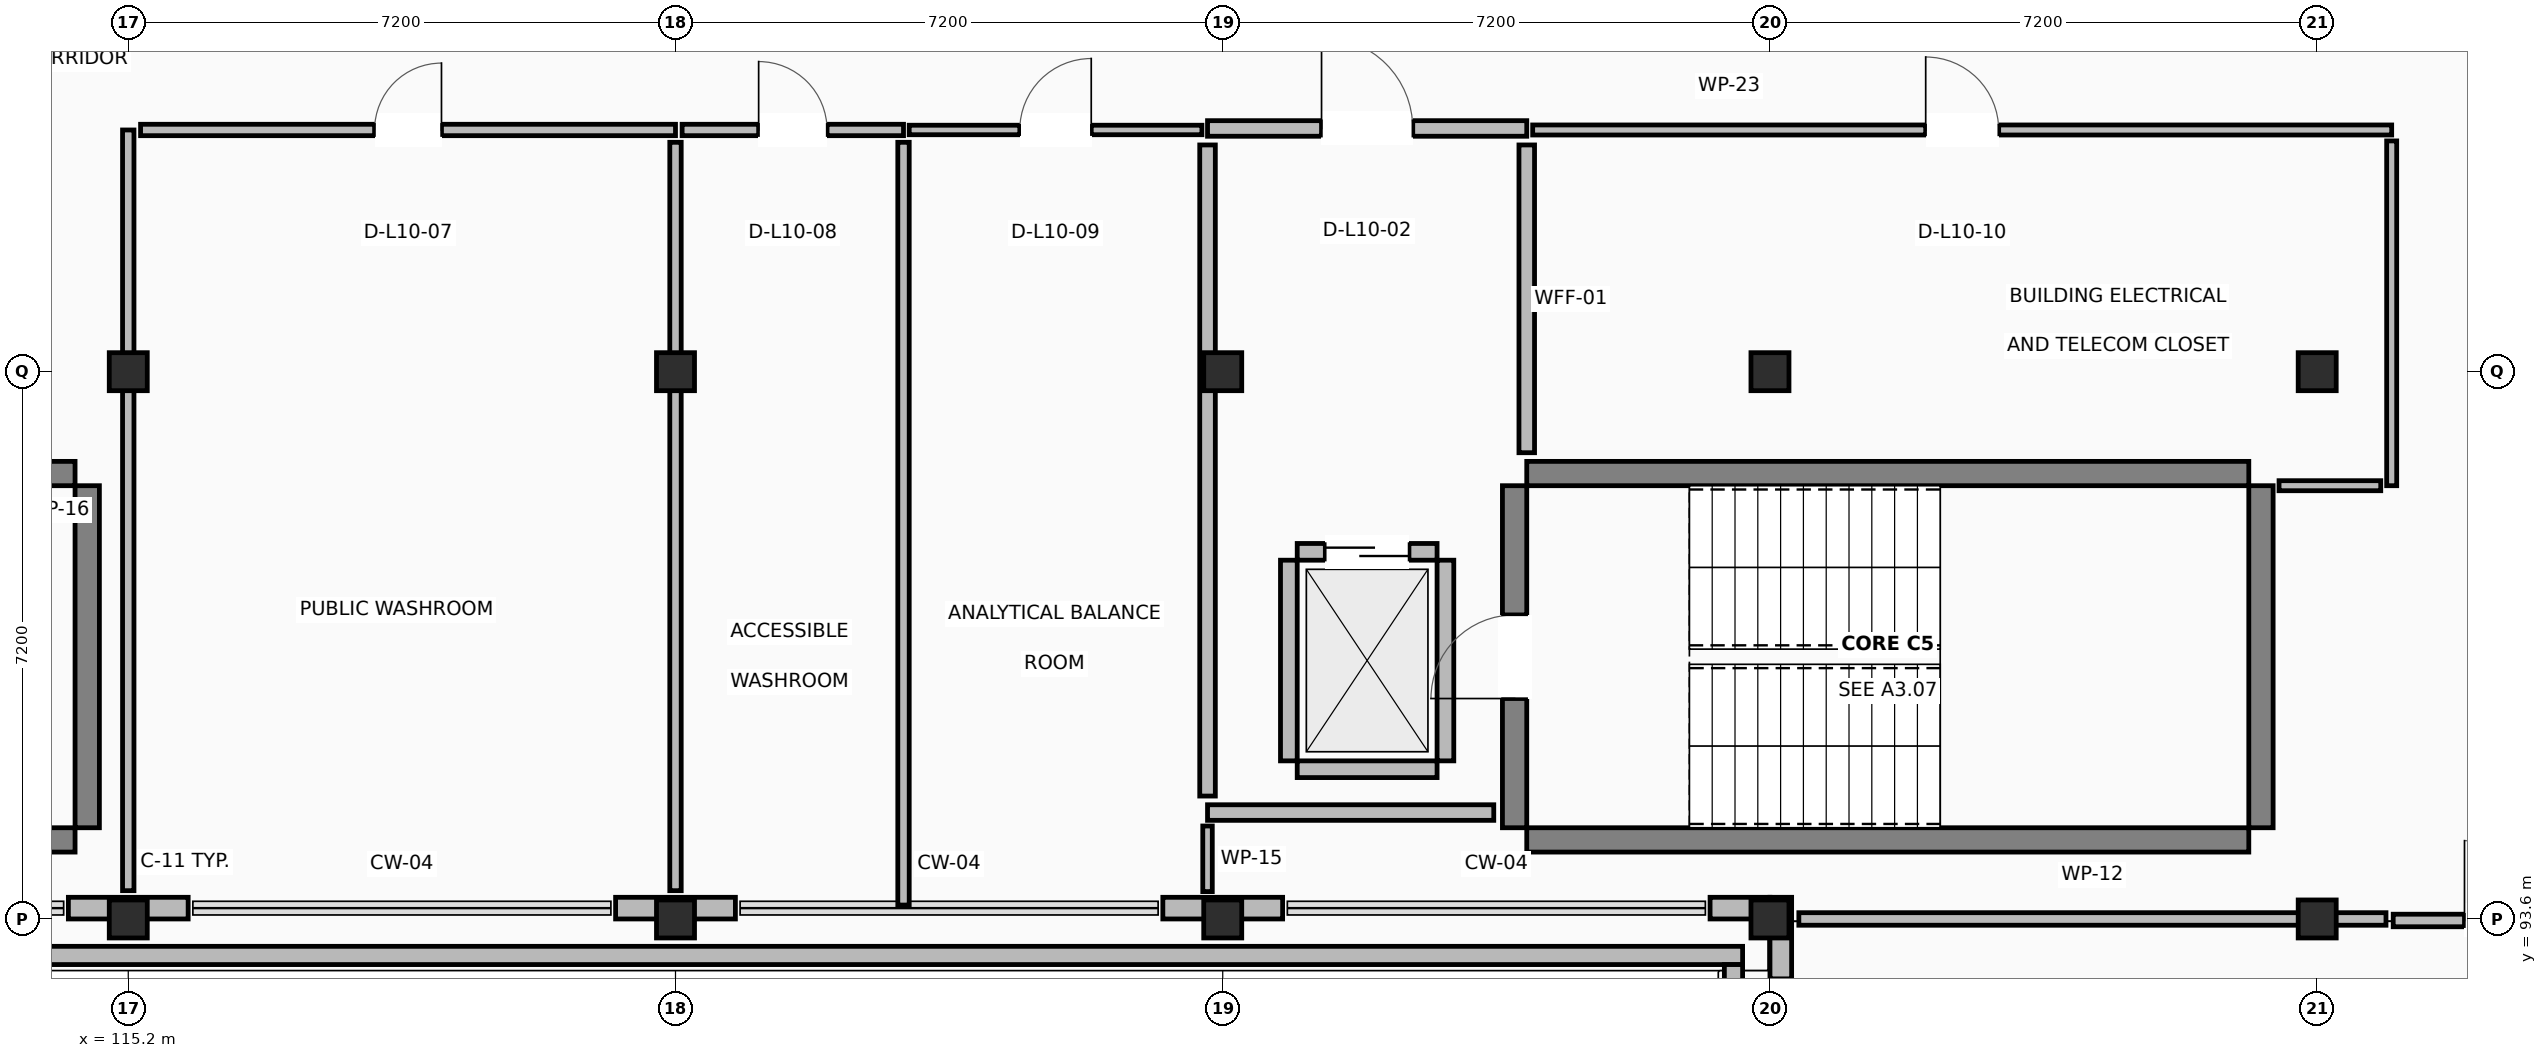
"""IFC4 building model, lengths in metres.
Left out: names, types, materials, properties, quantities, classifications, styles, units other than length and angle.
Written with IfcOpenShell. Run it as: python <this file> out.ifc"""

import sys

from ifc_helpers import new_model, si_unit, direction, frame, frame_2d, origin, origin_2d, place, context, subcontext, project, spatial, rectangle, extrude, element, fill, save


model = new_model("IFC4")
c1 = context("Model", 3, precision=1e-05, world=origin(), true_north=direction((0.0, 1.0)))
c2 = subcontext(c1, "Body", "Model", "MODEL_VIEW")
j1 = project(units=[si_unit("LENGTHUNIT", "METRE"), si_unit("PLANEANGLEUNIT", "RADIAN")], contexts=[c1])
p1 = place(None, origin())
s1 = spatial("IfcSite", under=j1, at=p1, CompositionType="ELEMENT")
p2 = place(p1, origin())
s2 = spatial("IfcBuilding", under=s1, at=p2, CompositionType="ELEMENT")
p3 = place(p2, frame((0.0, 0.0, 43.8)))
s3 = spatial("IfcBuildingStorey", under=s2, at=p3, CompositionType="ELEMENT", Elevation=43.8)
for number, where, z_axis, x_axis in (
    (1, (115.2, 93.6, 0.0), (0.0, 0.0, 1.0), (1.0, 0.0, 0.0)),
    (2, (115.2, 100.8, 0.0), (0.0, 0.0, 1.0), (1.0, 0.0, 0.0)),
    (3, (122.4, 93.6, 0.0), (0.0, 0.0, 1.0), (1.0, 0.0, 0.0)),
    (4, (122.4, 100.8, 0.0), (0.0, 0.0, 1.0), (1.0, 0.0, 0.0)),
    (5, (129.6, 93.6, 0.0), (0.0, 0.0, 1.0), (1.0, 0.0, 0.0)),
    (6, (129.6, 100.8, 0.0), (0.0, 0.0, 1.0), (1.0, 0.0, 0.0)),
    (7, (136.8, 93.6, 0.0), (0.0, 0.0, 1.0), (1.0, 0.0, 0.0)),
    (8, (136.8, 100.8, 0.0), (0.0, 0.0, 1.0), (1.0, 0.0, 0.0)),
    (9, (144.0, 93.6, 0.0), (0.0, 0.0, 1.0), (1.0, 0.0, 0.0)),
    (10, (144.0, 100.8, 0.0), (0.0, 0.0, 1.0), (1.0, 0.0, 0.0)),
):
    element("IfcColumn", number, at=place(p3, frame(where, z_axis=z_axis, x_axis=x_axis)), inside=s3, PredefinedType="COLUMN", context=c2, shape_type="SweptSolid", body=[
        extrude(rectangle(XDim=0.5, YDim=0.5, at=origin_2d()), origin(), (0.0, 0.0, 1.0), 3.92),
    ])
for number, where, z_axis, x_axis in (
    (11, (105.0, 94.64, 0.0), (0.0, 0.0, 1.0), (1.0, 0.0, 0.0)),
    (12, (105.0, 99.46, 0.0), (0.0, 0.0, 1.0), (1.0, 0.0, 0.0)),
):
    element("IfcWall", number, at=place(p3, frame(where, z_axis=z_axis, x_axis=x_axis)), inside=s3, PredefinedType="SHEAR", context=c2, shape_type="SweptSolid", body=[
        extrude(rectangle(XDim=9.5, YDim=0.32, at=frame_2d((4.75, 0.0))), origin(), (0.0, 0.0, 1.0), 3.92),
    ])
p4 = place(p3, frame((114.66, 94.8, 0.0), z_axis=(0.0, 0.0, 1.0), x_axis=(0.0, 1.0, 0.0)))
e13 = element("IfcWall", 13, at=p4, inside=s3, PredefinedType="SHEAR", context=c2, shape_type="SweptSolid", body=[
    extrude(rectangle(XDim=4.5, YDim=0.32, at=frame_2d((2.25, 0.0))), origin(), (0.0, 0.0, 1.0), 3.92),
])
for number, where, z_axis, x_axis in (
    (14, (133.6, 94.64, 0.0), (0.0, 0.0, 1.0), (1.0, 0.0, 0.0)),
    (15, (133.6, 99.46, 0.0), (0.0, 0.0, 1.0), (1.0, 0.0, 0.0)),
):
    element("IfcWall", number, at=place(p3, frame(where, z_axis=z_axis, x_axis=x_axis)), inside=s3, PredefinedType="SHEAR", context=c2, shape_type="SweptSolid", body=[
        extrude(rectangle(XDim=9.5, YDim=0.32, at=frame_2d((4.75, 0.0))), origin(), (0.0, 0.0, 1.0), 3.92),
    ])
p5 = place(p3, frame((133.44, 94.8, 0.0), z_axis=(0.0, 0.0, 1.0), x_axis=(0.0, 1.0, 0.0)))
e16 = element("IfcWall", 16, at=p5, inside=s3, PredefinedType="SHEAR", context=c2, shape_type="SweptSolid", body=[
    extrude(rectangle(XDim=4.5, YDim=0.32, at=frame_2d((2.25, 0.0))), origin(), (0.0, 0.0, 1.0), 3.92),
])
p6 = place(p5, frame((1.7, 0.0, 0.0)))
e17 = element("IfcOpeningElement", 17, at=p6, cuts=e16, PredefinedType="OPENING", context=c2, shape_type="SweptSolid", body=[
    extrude(rectangle(XDim=1.1, YDim=2.15, at=frame_2d((0.55, 1.075))), frame((0.0, 0.17, 0.0), z_axis=(0.0, -1.0, 0.0), x_axis=(1.0, 0.0, 0.0)), (0.0, 0.0, 1.0), 0.34),
])
p7 = place(p3, frame((143.26, 94.8, 0.0), z_axis=(0.0, 0.0, 1.0), x_axis=(0.0, 1.0, 0.0)))
e18 = element("IfcWall", 18, at=p7, inside=s3, PredefinedType="SHEAR", context=c2, shape_type="SweptSolid", body=[
    extrude(rectangle(XDim=4.5, YDim=0.32, at=frame_2d((2.25, 0.0))), origin(), (0.0, 0.0, 1.0), 3.92),
])
for number, where, z_axis, x_axis in (
    (19, (114.412, 93.742, 0.0), (0.0, 0.0, 1.0), (1.0, 0.0, 0.0)),
    (20, (121.612, 93.742, 0.0), (0.0, 0.0, 1.0), (1.0, 0.0, 0.0)),
    (21, (128.812, 93.742, 0.0), (0.0, 0.0, 1.0), (1.0, 0.0, 0.0)),
):
    element("IfcWall", number, at=place(p3, frame(where, z_axis=z_axis, x_axis=x_axis)), inside=s3, PredefinedType="STANDARD", context=c2, shape_type="SweptSolid", body=[
        extrude(rectangle(XDim=1.576, YDim=0.285, at=frame_2d((0.788, 0.0))), origin(), (0.0, 0.0, 1.0), 2.96),
    ])
p8 = place(p3, frame((136.012, 93.742, 0.0), z_axis=(0.0, 0.0, 1.0), x_axis=(1.0, 0.0, 0.0)))
e22 = element("IfcWall", 22, at=p8, inside=s3, PredefinedType="STANDARD", context=c2, shape_type="SweptSolid", body=[
    extrude(rectangle(XDim=0.788, YDim=0.285, at=frame_2d((0.394, 0.0))), origin(), (0.0, 0.0, 1.0), 2.96),
])
p9 = place(p3, frame((136.942, 93.885, 0.0), z_axis=(0.0, 0.0, 1.0), x_axis=(0.0, -1.0, 0.0)))
e23 = element("IfcWall", 23, at=p9, inside=s3, PredefinedType="STANDARD", context=c2, shape_type="SweptSolid", body=[
    extrude(rectangle(XDim=1.073, YDim=0.285, at=frame_2d((0.537, 0.0))), origin(), (0.0, 0.0, 1.0), 2.96),
])
p10 = place(p3, frame((136.44, 93.12, 0.0), z_axis=(0.0, 0.0, 1.0), x_axis=(-1.0, 0.0, 0.0)))
e24 = element("IfcWall", 24, at=p10, inside=s3, PredefinedType="PARAPET", context=c2, shape_type="SweptSolid", body=[
    extrude(rectangle(XDim=43.44, YDim=0.24, at=frame_2d((21.72, 0.0))), origin(), (0.0, 0.0, 1.0), 1.12),
])
p11 = place(p3, frame((136.32, 86.04, 0.0), z_axis=(0.0, 0.0, 1.0), x_axis=(0.0, 1.0, 0.0)))
e25 = element("IfcWall", 25, at=p11, inside=s3, PredefinedType="PARAPET", context=c2, shape_type="SweptSolid", body=[
    extrude(rectangle(XDim=6.96, YDim=0.24, at=frame_2d((3.48, 0.0))), origin(), (0.0, 0.0, 1.0), 1.12),
])
p12 = place(p3, frame((130.58, 95.57, 0.0), z_axis=(0.0, 0.0, 1.0), x_axis=(1.0, 0.0, 0.0)))
e26 = element("IfcWall", 26, at=p12, inside=s3, PredefinedType="STANDARD", context=c2, shape_type="SweptSolid", body=[
    extrude(rectangle(XDim=1.84, YDim=0.22, at=frame_2d((0.92, 0.0))), origin(), (0.0, 0.0, 1.0), 2.96),
])
p13 = place(p3, frame((130.58, 98.43, 0.0), z_axis=(0.0, 0.0, 1.0), x_axis=(1.0, 0.0, 0.0)))
e27 = element("IfcWall", 27, at=p13, inside=s3, PredefinedType="STANDARD", context=c2, shape_type="SweptSolid", body=[
    extrude(rectangle(XDim=1.84, YDim=0.22, at=frame_2d((0.92, 0.0))), origin(), (0.0, 0.0, 1.0), 2.96),
])
p14 = place(p13, frame((0.37, 0.0, 0.0)))
e28 = element("IfcOpeningElement", 28, at=p14, cuts=e27, PredefinedType="OPENING", context=c2, shape_type="SweptSolid", body=[
    extrude(rectangle(XDim=1.1, YDim=2.15, at=frame_2d((0.55, 1.075))), frame((0.0, 0.12, 0.0), z_axis=(0.0, -1.0, 0.0), x_axis=(1.0, 0.0, 0.0)), (0.0, 0.0, 1.0), 0.24),
])
for number, where, z_axis, x_axis in (
    (29, (130.47, 95.68, 0.0), (0.0, 0.0, 1.0), (0.0, 1.0, 0.0)),
    (30, (132.53, 95.68, 0.0), (0.0, 0.0, 1.0), (0.0, 1.0, 0.0)),
):
    element("IfcWall", number, at=place(p3, frame(where, z_axis=z_axis, x_axis=x_axis)), inside=s3, PredefinedType="STANDARD", context=c2, shape_type="SweptSolid", body=[
        extrude(rectangle(XDim=2.64, YDim=0.22, at=frame_2d((1.32, 0.0))), origin(), (0.0, 0.0, 1.0), 2.96),
    ])
p15 = place(p3, frame((129.4, 104.0, 0.0), z_axis=(0.0, 0.0, 1.0), x_axis=(1.0, 0.0, 0.0)))
e31 = element("IfcWall", 31, at=p15, inside=s3, PredefinedType="PARTITIONING", context=c2, shape_type="SweptSolid", body=[
    extrude(rectangle(XDim=4.2, YDim=0.205, at=frame_2d((2.1, 0.0))), origin(), (0.0, 0.0, 1.0), 2.96),
])
p16 = place(p15, frame((1.5, 0.0, 0.0)))
e32 = element("IfcOpeningElement", 32, at=p16, cuts=e31, PredefinedType="OPENING", context=c2, shape_type="SweptSolid", body=[
    extrude(rectangle(XDim=1.2, YDim=2.15, at=frame_2d((0.6, 1.075))), frame((0.0, 0.113, 0.0), z_axis=(0.0, -1.0, 0.0), x_axis=(1.0, 0.0, 0.0)), (0.0, 0.0, 1.0), 0.225),
])
p17 = place(p3, frame((133.6, 103.783, 0.0), z_axis=(0.0, 0.0, 1.0), x_axis=(0.0, -1.0, 0.0)))
e33 = element("IfcWall", 33, at=p17, inside=s3, PredefinedType="PARTITIONING", context=c2, shape_type="SweptSolid", body=[
    extrude(rectangle(XDim=4.049, YDim=0.205, at=frame_2d((2.024, 0.0))), origin(), (0.0, 0.0, 1.0), 2.96),
])
p18 = place(p3, frame((133.166, 95.0, 0.0), z_axis=(0.0, 0.0, 1.0), x_axis=(-1.0, 0.0, 0.0)))
e34 = element("IfcWall", 34, at=p18, inside=s3, PredefinedType="PARTITIONING", context=c2, shape_type="SweptSolid", body=[
    extrude(rectangle(XDim=3.766, YDim=0.205, at=frame_2d((1.883, 0.0))), origin(), (0.0, 0.0, 1.0), 2.96),
])
p19 = place(p3, frame((129.4, 95.217, 0.0), z_axis=(0.0, 0.0, 1.0), x_axis=(0.0, 1.0, 0.0)))
e35 = element("IfcWall", 35, at=p19, inside=s3, PredefinedType="PARTITIONING", context=c2, shape_type="SweptSolid", body=[
    extrude(rectangle(XDim=8.566, YDim=0.205, at=frame_2d((4.283, 0.0))), origin(), (0.0, 0.0, 1.0), 2.96),
])
p20 = place(p3, frame((115.2, 93.972, 0.0), z_axis=(0.0, 0.0, 1.0), x_axis=(0.0, 1.0, 0.0)))
e36 = element("IfcWall", 36, at=p20, inside=s3, PredefinedType="PARTITIONING", context=c2, shape_type="SweptSolid", body=[
    extrude(rectangle(XDim=10.008, YDim=0.15, at=frame_2d((5.004, 0.0))), origin(), (0.0, 0.0, 1.0), 2.96),
])
p21 = place(p3, frame((115.362, 103.98, 0.0), z_axis=(0.0, 0.0, 1.0), x_axis=(1.0, 0.0, 0.0)))
e37 = element("IfcWall", 37, at=p21, inside=s3, PredefinedType="PARTITIONING", context=c2, shape_type="SweptSolid", body=[
    extrude(rectangle(XDim=7.038, YDim=0.15, at=frame_2d((3.519, 0.0))), origin(), (0.0, 0.0, 1.0), 2.96),
])
p22 = place(p21, frame((3.079, 0.0, 0.0)))
e38 = element("IfcOpeningElement", 38, at=p22, cuts=e37, PredefinedType="OPENING", context=c2, shape_type="SweptSolid", body=[
    extrude(rectangle(XDim=0.88, YDim=2.1, at=frame_2d((0.44, 1.05))), frame((0.0, 0.085, 0.0), z_axis=(0.0, -1.0, 0.0), x_axis=(1.0, 0.0, 0.0)), (0.0, 0.0, 1.0), 0.17),
])
p23 = place(p3, frame((122.4, 103.818, 0.0), z_axis=(0.0, 0.0, 1.0), x_axis=(0.0, -1.0, 0.0)))
e39 = element("IfcWall", 39, at=p23, inside=s3, PredefinedType="PARTITIONING", context=c2, shape_type="SweptSolid", body=[
    extrude(rectangle(XDim=9.846, YDim=0.15, at=frame_2d((4.923, 0.0))), origin(), (0.0, 0.0, 1.0), 2.96),
])
p24 = place(p3, frame((122.487, 103.98, 0.0), z_axis=(0.0, 0.0, 1.0), x_axis=(1.0, 0.0, 0.0)))
e40 = element("IfcWall", 40, at=p24, inside=s3, PredefinedType="PARTITIONING", context=c2, shape_type="SweptSolid", body=[
    extrude(rectangle(XDim=2.913, YDim=0.15, at=frame_2d((1.457, 0.0))), origin(), (0.0, 0.0, 1.0), 2.96),
])
p25 = place(p24, frame((1.007, 0.0, 0.0)))
e41 = element("IfcOpeningElement", 41, at=p25, cuts=e40, PredefinedType="OPENING", context=c2, shape_type="SweptSolid", body=[
    extrude(rectangle(XDim=0.9, YDim=2.1, at=frame_2d((0.45, 1.05))), frame((0.0, 0.085, 0.0), z_axis=(0.0, -1.0, 0.0), x_axis=(1.0, 0.0, 0.0)), (0.0, 0.0, 1.0), 0.17),
])
p26 = place(p3, frame((125.4, 103.818, 0.0), z_axis=(0.0, 0.0, 1.0), x_axis=(0.0, -1.0, 0.0)))
e42 = element("IfcWall", 42, at=p26, inside=s3, PredefinedType="PARTITIONING", context=c2, shape_type="SweptSolid", body=[
    extrude(rectangle(XDim=10.035, YDim=0.15, at=frame_2d((5.018, 0.0))), origin(), (0.0, 0.0, 1.0), 2.96),
])
p27 = place(p3, frame((125.475, 103.98, 0.0), z_axis=(0.0, 0.0, 1.0), x_axis=(1.0, 0.0, 0.0)))
e43 = element("IfcWall", 43, at=p27, inside=s3, PredefinedType="PARTITIONING", context=c2, shape_type="SweptSolid", body=[
    extrude(rectangle(XDim=3.851, YDim=0.125, at=frame_2d((1.925, 0.0))), origin(), (0.0, 0.0, 1.0), 2.96),
])
p28 = place(p27, frame((1.455, 0.0, 0.0)))
e44 = element("IfcOpeningElement", 44, at=p28, cuts=e43, PredefinedType="OPENING", context=c2, shape_type="SweptSolid", body=[
    extrude(rectangle(XDim=0.94, YDim=2.1, at=frame_2d((0.47, 1.05))), frame((0.0, 0.073, 0.0), z_axis=(0.0, -1.0, 0.0), x_axis=(1.0, 0.0, 0.0)), (0.0, 0.0, 1.0), 0.145),
])
p29 = place(p3, frame((129.4, 94.823, 0.0), z_axis=(0.0, 0.0, 1.0), x_axis=(0.0, -1.0, 0.0)))
e45 = element("IfcWall", 45, at=p29, inside=s3, PredefinedType="PARTITIONING", context=c2, shape_type="SweptSolid", body=[
    extrude(rectangle(XDim=0.863, YDim=0.125, at=frame_2d((0.432, 0.0))), origin(), (0.0, 0.0, 1.0), 2.96),
])
p30 = place(p3, frame((133.678, 103.98, 0.0), z_axis=(0.0, 0.0, 1.0), x_axis=(1.0, 0.0, 0.0)))
e46 = element("IfcWall", 46, at=p30, inside=s3, PredefinedType="PARTITIONING", context=c2, shape_type="SweptSolid", body=[
    extrude(rectangle(XDim=11.302, YDim=0.132, at=frame_2d((5.651, 0.0))), origin(), (0.0, 0.0, 1.0), 2.96),
])
p31 = place(p30, frame((5.171, 0.0, 0.0)))
e47 = element("IfcOpeningElement", 47, at=p31, cuts=e46, PredefinedType="OPENING", context=c2, shape_type="SweptSolid", body=[
    extrude(rectangle(XDim=0.96, YDim=2.1, at=frame_2d((0.48, 1.05))), frame((0.0, 0.076, 0.0), z_axis=(0.0, -1.0, 0.0), x_axis=(1.0, 0.0, 0.0)), (0.0, 0.0, 1.0), 0.152),
])
p32 = place(p3, frame((144.98, 103.836, 0.0), z_axis=(0.0, 0.0, 1.0), x_axis=(0.0, -1.0, 0.0)))
e48 = element("IfcWall", 48, at=p32, inside=s3, PredefinedType="PARTITIONING", context=c2, shape_type="SweptSolid", body=[
    extrude(rectangle(XDim=4.536, YDim=0.132, at=frame_2d((2.268, 0.0))), origin(), (0.0, 0.0, 1.0), 2.96),
])
p33 = place(p3, frame((144.836, 99.3, 0.0), z_axis=(0.0, 0.0, 1.0), x_axis=(-1.0, 0.0, 0.0)))
e49 = element("IfcWall", 49, at=p33, inside=s3, PredefinedType="PARTITIONING", context=c2, shape_type="SweptSolid", body=[
    extrude(rectangle(XDim=1.338, YDim=0.132, at=frame_2d((0.669, 0.0))), origin(), (0.0, 0.0, 1.0), 2.96),
])
p34 = place(p3, frame((145.0, 93.58, 0.0), z_axis=(0.0, 0.0, 1.0), x_axis=(1.0, 0.0, 0.0)))
e50 = element("IfcWall", 50, at=p34, inside=s3, PredefinedType="PARTITIONING", context=c2, shape_type="SweptSolid", body=[
    extrude(rectangle(XDim=2.925, YDim=0.165, at=frame_2d((1.462, 0.0))), origin(), (0.0, 0.0, 1.0), 2.96),
])
p35 = place(p34, frame((0.938, 0.0, 0.0)))
e51 = element("IfcOpeningElement", 51, at=p35, cuts=e50, PredefinedType="OPENING", context=c2, shape_type="SweptSolid", body=[
    extrude(rectangle(XDim=1.05, YDim=2.15, at=frame_2d((0.525, 1.075))), frame((0.0, 0.093, 0.0), z_axis=(0.0, -1.0, 0.0), x_axis=(1.0, 0.0, 0.0)), (0.0, 0.0, 1.0), 0.185),
])
p36 = place(p3, frame((137.18, 93.6, 0.0), z_axis=(0.0, 0.0, 1.0), x_axis=(1.0, 0.0, 0.0)))
e52 = element("IfcWall", 52, at=p36, inside=s3, PredefinedType="PARTITIONING", context=c2, shape_type="SweptSolid", body=[
    extrude(rectangle(XDim=7.725, YDim=0.165, at=frame_2d((3.863, 0.0))), origin(), (0.0, 0.0, 1.0), 2.96),
])
p37 = place(p6, origin())
e53 = element("IfcDoor", 53, at=p37, inside=s3, OperationType="SINGLE_SWING_LEFT", PredefinedType="DOOR", context=c2, shape_type="SweptSolid", body=[
    extrude(rectangle(XDim=1.1, YDim=2.15, at=frame_2d((0.55, 1.075))), frame((0.0, 0.025, 0.0), z_axis=(0.0, -1.0, 0.0), x_axis=(1.0, 0.0, 0.0)), (0.0, 0.0, 1.0), 0.05),
])
fill(e17, e53)
p38 = place(p14, origin())
e54 = element("IfcDoor", 54, at=p38, inside=s3, OperationType="SLIDING_TO_LEFT", PredefinedType="DOOR", context=c2, shape_type="SweptSolid", body=[
    extrude(rectangle(XDim=1.1, YDim=2.15, at=frame_2d((0.55, 1.075))), frame((0.0, 0.025, 0.0), z_axis=(0.0, -1.0, 0.0), x_axis=(1.0, 0.0, 0.0)), (0.0, 0.0, 1.0), 0.05),
])
fill(e28, e54)
p39 = place(p16, origin())
e55 = element("IfcDoor", 55, at=p39, inside=s3, OperationType="SINGLE_SWING_LEFT", PredefinedType="DOOR", context=c2, shape_type="SweptSolid", body=[
    extrude(rectangle(XDim=1.2, YDim=2.15, at=frame_2d((0.6, 1.075))), frame((0.0, 0.025, 0.0), z_axis=(0.0, -1.0, 0.0), x_axis=(1.0, 0.0, 0.0)), (0.0, 0.0, 1.0), 0.05),
])
fill(e32, e55)
p40 = place(p22, origin())
e56 = element("IfcDoor", 56, at=p40, inside=s3, OperationType="SINGLE_SWING_RIGHT", PredefinedType="DOOR", context=c2, shape_type="SweptSolid", body=[
    extrude(rectangle(XDim=0.88, YDim=2.1, at=frame_2d((0.44, 1.05))), frame((0.0, 0.025, 0.0), z_axis=(0.0, -1.0, 0.0), x_axis=(1.0, 0.0, 0.0)), (0.0, 0.0, 1.0), 0.05),
])
fill(e38, e56)
p41 = place(p25, origin())
e57 = element("IfcDoor", 57, at=p41, inside=s3, OperationType="SINGLE_SWING_LEFT", PredefinedType="DOOR", context=c2, shape_type="SweptSolid", body=[
    extrude(rectangle(XDim=0.9, YDim=2.1, at=frame_2d((0.45, 1.05))), frame((0.0, 0.025, 0.0), z_axis=(0.0, -1.0, 0.0), x_axis=(1.0, 0.0, 0.0)), (0.0, 0.0, 1.0), 0.05),
])
fill(e41, e57)
p42 = place(p28, origin())
e58 = element("IfcDoor", 58, at=p42, inside=s3, OperationType="SINGLE_SWING_RIGHT", PredefinedType="DOOR", context=c2, shape_type="SweptSolid", body=[
    extrude(rectangle(XDim=0.94, YDim=2.1, at=frame_2d((0.47, 1.05))), frame((0.0, 0.025, 0.0), z_axis=(0.0, -1.0, 0.0), x_axis=(1.0, 0.0, 0.0)), (0.0, 0.0, 1.0), 0.05),
])
fill(e44, e58)
p43 = place(p31, origin())
e59 = element("IfcDoor", 59, at=p43, inside=s3, OperationType="SINGLE_SWING_LEFT", PredefinedType="DOOR", context=c2, shape_type="SweptSolid", body=[
    extrude(rectangle(XDim=0.96, YDim=2.1, at=frame_2d((0.48, 1.05))), frame((0.0, 0.025, 0.0), z_axis=(0.0, -1.0, 0.0), x_axis=(1.0, 0.0, 0.0)), (0.0, 0.0, 1.0), 0.05),
])
fill(e47, e59)
p44 = place(p35, origin())
e60 = element("IfcDoor", 60, at=p44, inside=s3, OperationType="SINGLE_SWING_LEFT", PredefinedType="DOOR", context=c2, shape_type="SweptSolid", body=[
    extrude(rectangle(XDim=1.05, YDim=2.15, at=frame_2d((0.525, 1.075))), frame((0.0, 0.025, 0.0), z_axis=(0.0, -1.0, 0.0), x_axis=(1.0, 0.0, 0.0)), (0.0, 0.0, 1.0), 0.05),
])
fill(e51, e60)
save(model, sys.argv[1])
